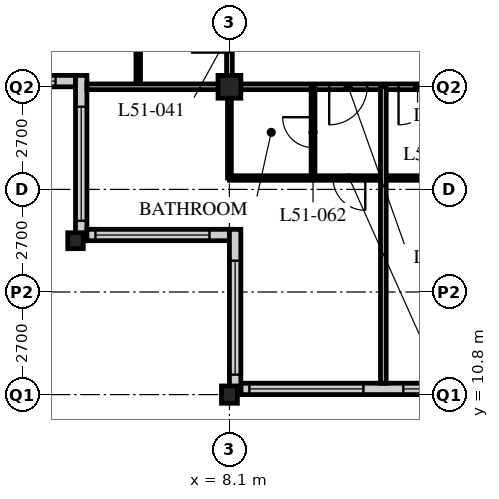
"""IFC4 building model, lengths in metres.
Left out: names, types, materials, properties, quantities, classifications, styles, units other than length and angle.
Written with IfcOpenShell. Run it as: python <this file> out.ifc"""

import sys

from ifc_helpers import new_model, si_unit, direction, frame, frame_2d, origin, origin_2d, place, context, subcontext, project, spatial, rectangle, hollow_rectangle, i_section, extrude, element, fill, save


model = new_model("IFC4")
c1 = context("Model", 3, precision=1e-05, world=origin(), true_north=direction((0.0, 1.0)))
c2 = subcontext(c1, "Body", "Model", "MODEL_VIEW")
j1 = project(units=[si_unit("LENGTHUNIT", "METRE"), si_unit("PLANEANGLEUNIT", "RADIAN")], contexts=[c1])
p1 = place(None, origin())
s1 = spatial("IfcSite", under=j1, at=p1, CompositionType="ELEMENT")
p2 = place(p1, origin())
s2 = spatial("IfcBuilding", under=s1, at=p2, CompositionType="ELEMENT")
p3 = place(p2, frame((0.0, 0.0, 199.2)))
s3 = spatial("IfcBuildingStorey", under=s2, at=p3, CompositionType="ELEMENT", Elevation=199.2)
p4 = place(p3, frame((4.05, 14.85, 0.0), z_axis=(0.0, 0.0, 1.0), x_axis=(1.0, 0.0, 0.0)))
e1 = element("IfcColumn", 1, at=p4, inside=s3, PredefinedType="COLUMN", context=c2, shape_type="SweptSolid", body=[
    extrude(i_section(OverallWidth=0.407, OverallDepth=0.419, WebThickness=0.031, FlangeThickness=0.049, FilletRadius=0.015, at=origin_2d()), origin(), (0.0, 0.0, 1.0), 3.6),
])
p5 = place(p3, frame((8.1, 10.8, 0.0), z_axis=(0.0, 0.0, 1.0), x_axis=(1.0, 0.0, 0.0)))
e2 = element("IfcColumn", 2, at=p5, inside=s3, PredefinedType="COLUMN", context=c2, shape_type="SweptSolid", body=[
    extrude(i_section(OverallWidth=0.418, OverallDepth=0.456, WebThickness=0.042, FlangeThickness=0.067, FilletRadius=0.015, at=origin_2d()), origin(), (0.0, 0.0, 1.0), 3.6),
])
p6 = place(p3, frame((8.1, 18.9, 0.0), z_axis=(0.0, 0.0, 1.0), x_axis=(1.0, 0.0, 0.0)))
e3 = element("IfcColumn", 3, at=p6, inside=s3, PredefinedType="COLUMN", context=c2, shape_type="SweptSolid", body=[
    extrude(hollow_rectangle(XDim=0.6, YDim=0.6, WallThickness=0.05, at=origin_2d()), origin(), (0.0, 0.0, 1.0), 3.6),
])
p7 = place(p3, frame((8.4, 10.95, 0.0), z_axis=(0.0, 0.0, 1.0), x_axis=(1.0, 0.0, 0.0)))
e4 = element("IfcWall", 4, at=p7, inside=s3, PredefinedType="SOLIDWALL", context=c2, shape_type="SweptSolid", body=[
    extrude(rectangle(XDim=40.2, YDim=0.3, at=frame_2d((20.1, 0.0))), origin(), (0.0, 0.0, 1.0), 3.39),
])
p8 = place(p7, frame((0.225, 0.0, 0.6)))
e5 = element("IfcOpeningElement", 5, at=p8, cuts=e4, PredefinedType="OPENING", context=c2, shape_type="SweptSolid", body=[
    extrude(rectangle(XDim=3.0, YDim=2.4, at=frame_2d((1.5, 1.2))), frame((0.0, 0.16, 0.0), z_axis=(0.0, -1.0, 0.0), x_axis=(1.0, 0.0, 0.0)), (0.0, 0.0, 1.0), 0.32),
])
p9 = place(p7, frame((4.275, 0.0, 0.6)))
e6 = element("IfcOpeningElement", 6, at=p9, cuts=e4, PredefinedType="OPENING", context=c2, shape_type="SweptSolid", body=[
    extrude(rectangle(XDim=3.0, YDim=2.4, at=frame_2d((1.5, 1.2))), frame((0.0, 0.16, 0.0), z_axis=(0.0, -1.0, 0.0), x_axis=(1.0, 0.0, 0.0)), (0.0, 0.0, 1.0), 0.32),
])
p10 = place(p7, frame((8.325, 0.0, 0.6)))
e7 = element("IfcOpeningElement", 7, at=p10, cuts=e4, PredefinedType="OPENING", context=c2, shape_type="SweptSolid", body=[
    extrude(rectangle(XDim=3.0, YDim=2.4, at=frame_2d((1.5, 1.2))), frame((0.0, 0.16, 0.0), z_axis=(0.0, -1.0, 0.0), x_axis=(1.0, 0.0, 0.0)), (0.0, 0.0, 1.0), 0.32),
])
p11 = place(p7, frame((12.375, 0.0, 0.6)))
e8 = element("IfcOpeningElement", 8, at=p11, cuts=e4, PredefinedType="OPENING", context=c2, shape_type="SweptSolid", body=[
    extrude(rectangle(XDim=3.0, YDim=2.4, at=frame_2d((1.5, 1.2))), frame((0.0, 0.16, 0.0), z_axis=(0.0, -1.0, 0.0), x_axis=(1.0, 0.0, 0.0)), (0.0, 0.0, 1.0), 0.32),
])
p12 = place(p7, frame((16.425, 0.0, 0.6)))
e9 = element("IfcOpeningElement", 9, at=p12, cuts=e4, PredefinedType="OPENING", context=c2, shape_type="SweptSolid", body=[
    extrude(rectangle(XDim=3.0, YDim=2.4, at=frame_2d((1.5, 1.2))), frame((0.0, 0.16, 0.0), z_axis=(0.0, -1.0, 0.0), x_axis=(1.0, 0.0, 0.0)), (0.0, 0.0, 1.0), 0.32),
])
p13 = place(p7, frame((20.475, 0.0, 0.6)))
e10 = element("IfcOpeningElement", 10, at=p13, cuts=e4, PredefinedType="OPENING", context=c2, shape_type="SweptSolid", body=[
    extrude(rectangle(XDim=3.0, YDim=2.4, at=frame_2d((1.5, 1.2))), frame((0.0, 0.16, 0.0), z_axis=(0.0, -1.0, 0.0), x_axis=(1.0, 0.0, 0.0)), (0.0, 0.0, 1.0), 0.32),
])
p14 = place(p7, frame((24.525, 0.0, 0.6)))
e11 = element("IfcOpeningElement", 11, at=p14, cuts=e4, PredefinedType="OPENING", context=c2, shape_type="SweptSolid", body=[
    extrude(rectangle(XDim=3.0, YDim=2.4, at=frame_2d((1.5, 1.2))), frame((0.0, 0.16, 0.0), z_axis=(0.0, -1.0, 0.0), x_axis=(1.0, 0.0, 0.0)), (0.0, 0.0, 1.0), 0.32),
])
p15 = place(p7, frame((28.575, 0.0, 0.6)))
e12 = element("IfcOpeningElement", 12, at=p15, cuts=e4, PredefinedType="OPENING", context=c2, shape_type="SweptSolid", body=[
    extrude(rectangle(XDim=3.0, YDim=2.4, at=frame_2d((1.5, 1.2))), frame((0.0, 0.16, 0.0), z_axis=(0.0, -1.0, 0.0), x_axis=(1.0, 0.0, 0.0)), (0.0, 0.0, 1.0), 0.32),
])
p16 = place(p7, frame((32.625, 0.0, 0.6)))
e13 = element("IfcOpeningElement", 13, at=p16, cuts=e4, PredefinedType="OPENING", context=c2, shape_type="SweptSolid", body=[
    extrude(rectangle(XDim=3.0, YDim=2.4, at=frame_2d((1.5, 1.2))), frame((0.0, 0.16, 0.0), z_axis=(0.0, -1.0, 0.0), x_axis=(1.0, 0.0, 0.0)), (0.0, 0.0, 1.0), 0.32),
])
p17 = place(p7, frame((36.675, 0.0, 0.6)))
e14 = element("IfcOpeningElement", 14, at=p17, cuts=e4, PredefinedType="OPENING", context=c2, shape_type="SweptSolid", body=[
    extrude(rectangle(XDim=3.0, YDim=2.4, at=frame_2d((1.5, 1.2))), frame((0.0, 0.16, 0.0), z_axis=(0.0, -1.0, 0.0), x_axis=(1.0, 0.0, 0.0)), (0.0, 0.0, 1.0), 0.32),
])
p18 = place(p3, frame((0.3, 19.05, 0.0), z_axis=(0.0, 0.0, 1.0), x_axis=(1.0, 0.0, 0.0)))
e15 = element("IfcWall", 15, at=p18, inside=s3, PredefinedType="SOLIDWALL", context=c2, shape_type="SweptSolid", body=[
    extrude(rectangle(XDim=3.75, YDim=0.3, at=frame_2d((1.875, 0.0))), origin(), (0.0, 0.0, 1.0), 3.39),
])
p19 = place(p18, frame((0.225, 0.0, 0.6)))
e16 = element("IfcOpeningElement", 16, at=p19, cuts=e15, PredefinedType="OPENING", context=c2, shape_type="SweptSolid", body=[
    extrude(rectangle(XDim=3.0, YDim=2.0, at=frame_2d((1.5, 1.0))), frame((0.0, 0.16, 0.0), z_axis=(0.0, -1.0, 0.0), x_axis=(1.0, 0.0, 0.0)), (0.0, 0.0, 1.0), 0.32),
])
p20 = place(p3, frame((4.2, 19.2, 0.0), z_axis=(0.0, 0.0, 1.0), x_axis=(0.0, -1.0, 0.0)))
e17 = element("IfcWall", 17, at=p20, inside=s3, PredefinedType="SOLIDWALL", context=c2, shape_type="SweptSolid", body=[
    extrude(rectangle(XDim=4.35, YDim=0.3, at=frame_2d((2.175, 0.0))), origin(), (0.0, 0.0, 1.0), 3.39),
])
p21 = place(p20, frame((0.825, 0.0, 0.6)))
e18 = element("IfcOpeningElement", 18, at=p21, cuts=e17, PredefinedType="OPENING", context=c2, shape_type="SweptSolid", body=[
    extrude(rectangle(XDim=3.0, YDim=2.0, at=frame_2d((1.5, 1.0))), frame((0.0, 0.16, 0.0), z_axis=(0.0, -1.0, 0.0), x_axis=(1.0, 0.0, 0.0)), (0.0, 0.0, 1.0), 0.32),
])
p22 = place(p3, frame((4.35, 15.0, 0.0), z_axis=(0.0, 0.0, 1.0), x_axis=(1.0, 0.0, 0.0)))
e19 = element("IfcWall", 19, at=p22, inside=s3, PredefinedType="SOLIDWALL", context=c2, shape_type="SweptSolid", body=[
    extrude(rectangle(XDim=3.75, YDim=0.3, at=frame_2d((1.875, 0.0))), origin(), (0.0, 0.0, 1.0), 3.39),
])
p23 = place(p22, frame((0.225, 0.0, 0.6)))
e20 = element("IfcOpeningElement", 20, at=p23, cuts=e19, PredefinedType="OPENING", context=c2, shape_type="SweptSolid", body=[
    extrude(rectangle(XDim=3.0, YDim=2.0, at=frame_2d((1.5, 1.0))), frame((0.0, 0.16, 0.0), z_axis=(0.0, -1.0, 0.0), x_axis=(1.0, 0.0, 0.0)), (0.0, 0.0, 1.0), 0.32),
])
p24 = place(p3, frame((8.25, 15.15, 0.0), z_axis=(0.0, 0.0, 1.0), x_axis=(0.0, -1.0, 0.0)))
e21 = element("IfcWall", 21, at=p24, inside=s3, PredefinedType="SOLIDWALL", context=c2, shape_type="SweptSolid", body=[
    extrude(rectangle(XDim=4.35, YDim=0.3, at=frame_2d((2.175, 0.0))), origin(), (0.0, 0.0, 1.0), 3.39),
])
p25 = place(p24, frame((0.825, 0.0, 0.6)))
e22 = element("IfcOpeningElement", 22, at=p25, cuts=e21, PredefinedType="OPENING", context=c2, shape_type="SweptSolid", body=[
    extrude(rectangle(XDim=3.0, YDim=2.0, at=frame_2d((1.5, 1.0))), frame((0.0, 0.16, 0.0), z_axis=(0.0, -1.0, 0.0), x_axis=(1.0, 0.0, 0.0)), (0.0, 0.0, 1.0), 0.32),
])
p26 = place(p3, frame((8.1, 18.9, 0.0), z_axis=(0.0, 0.0, 1.0), x_axis=(1.0, 0.0, 0.0)))
e23 = element("IfcWall", 23, at=p26, inside=s3, PredefinedType="PARTITIONING", context=c2, shape_type="SweptSolid", body=[
    extrude(rectangle(XDim=40.5, YDim=0.15, at=frame_2d((20.25, 0.0))), origin(), (0.0, 0.0, 1.0), 2.778),
])
p27 = place(p26, frame((4.45, 0.0, 0.0)))
e24 = element("IfcOpeningElement", 24, at=p27, cuts=e23, PredefinedType="OPENING", context=c2, shape_type="SweptSolid", body=[
    extrude(rectangle(XDim=1.0, YDim=2.1, at=frame_2d((0.5, 1.05))), frame((0.0, 0.085, 0.0), z_axis=(0.0, -1.0, 0.0), x_axis=(1.0, 0.0, 0.0)), (0.0, 0.0, 1.0), 0.17),
])
p28 = place(p26, frame((17.1, 0.0, 0.0)))
e25 = element("IfcOpeningElement", 25, at=p28, cuts=e23, PredefinedType="OPENING", context=c2, shape_type="SweptSolid", body=[
    extrude(rectangle(XDim=1.0, YDim=2.1, at=frame_2d((0.5, 1.05))), frame((0.0, 0.085, 0.0), z_axis=(0.0, -1.0, 0.0), x_axis=(1.0, 0.0, 0.0)), (0.0, 0.0, 1.0), 0.17),
])
p29 = place(p26, frame((28.75, 0.0, 0.0)))
e26 = element("IfcOpeningElement", 26, at=p29, cuts=e23, PredefinedType="OPENING", context=c2, shape_type="SweptSolid", body=[
    extrude(rectangle(XDim=1.0, YDim=2.1, at=frame_2d((0.5, 1.05))), frame((0.0, 0.085, 0.0), z_axis=(0.0, -1.0, 0.0), x_axis=(1.0, 0.0, 0.0)), (0.0, 0.0, 1.0), 0.17),
])
p30 = place(p26, frame((2.625, 0.0, 0.0)))
e27 = element("IfcOpeningElement", 27, at=p30, cuts=e23, PredefinedType="OPENING", context=c2, shape_type="SweptSolid", body=[
    extrude(rectangle(XDim=1.0, YDim=2.1, at=frame_2d((0.5, 1.05))), frame((0.0, 0.085, 0.0), z_axis=(0.0, -1.0, 0.0), x_axis=(1.0, 0.0, 0.0)), (0.0, 0.0, 1.0), 0.17),
])
p31 = place(p26, frame((36.875, 0.0, 0.0)))
e28 = element("IfcOpeningElement", 28, at=p31, cuts=e23, PredefinedType="OPENING", context=c2, shape_type="SweptSolid", body=[
    extrude(rectangle(XDim=1.0, YDim=2.1, at=frame_2d((0.5, 1.05))), frame((0.0, 0.085, 0.0), z_axis=(0.0, -1.0, 0.0), x_axis=(1.0, 0.0, 0.0)), (0.0, 0.0, 1.0), 0.17),
])
p32 = place(p3, frame((8.1, 18.9, 0.0), z_axis=(0.0, 0.0, 1.0), x_axis=(0.0, 1.0, 0.0)))
e29 = element("IfcWall", 29, at=p32, inside=s3, PredefinedType="PARTITIONING", context=c2, shape_type="SweptSolid", body=[
    extrude(rectangle(XDim=24.3, YDim=0.15, at=frame_2d((12.15, 0.0))), origin(), (0.0, 0.0, 1.0), 2.778),
])
p33 = place(p32, frame((0.9, 0.0, 0.0)))
e30 = element("IfcOpeningElement", 30, at=p33, cuts=e29, PredefinedType="OPENING", context=c2, shape_type="SweptSolid", body=[
    extrude(rectangle(XDim=1.0, YDim=2.1, at=frame_2d((0.5, 1.05))), frame((0.0, 0.085, 0.0), z_axis=(0.0, -1.0, 0.0), x_axis=(1.0, 0.0, 0.0)), (0.0, 0.0, 1.0), 0.17),
])
p34 = place(p32, frame((9.0, 0.0, 0.0)))
e31 = element("IfcOpeningElement", 31, at=p34, cuts=e29, PredefinedType="OPENING", context=c2, shape_type="SweptSolid", body=[
    extrude(rectangle(XDim=1.0, YDim=2.1, at=frame_2d((0.5, 1.05))), frame((0.0, 0.085, 0.0), z_axis=(0.0, -1.0, 0.0), x_axis=(1.0, 0.0, 0.0)), (0.0, 0.0, 1.0), 0.17),
])
p35 = place(p32, frame((17.1, 0.0, 0.0)))
e32 = element("IfcOpeningElement", 32, at=p35, cuts=e29, PredefinedType="OPENING", context=c2, shape_type="SweptSolid", body=[
    extrude(rectangle(XDim=1.0, YDim=2.1, at=frame_2d((0.5, 1.05))), frame((0.0, 0.085, 0.0), z_axis=(0.0, -1.0, 0.0), x_axis=(1.0, 0.0, 0.0)), (0.0, 0.0, 1.0), 0.17),
])
p36 = place(p3, frame((5.7, 18.9, 0.0), z_axis=(0.0, 0.0, 1.0), x_axis=(0.0, 1.0, 0.0)))
e33 = element("IfcWall", 33, at=p36, inside=s3, PredefinedType="PARTITIONING", context=c2, shape_type="SweptSolid", body=[
    extrude(rectangle(XDim=24.3, YDim=0.12, at=frame_2d((12.15, 0.0))), origin(), (0.0, 0.0, 1.0), 3.39),
])
p37 = place(p36, frame((0.975, 0.0, 0.0)))
e34 = element("IfcOpeningElement", 34, at=p37, cuts=e33, PredefinedType="OPENING", context=c2, shape_type="SweptSolid", body=[
    extrude(rectangle(XDim=0.85, YDim=2.1, at=frame_2d((0.425, 1.05))), frame((0.0, 0.07, 0.0), z_axis=(0.0, -1.0, 0.0), x_axis=(1.0, 0.0, 0.0)), (0.0, 0.0, 1.0), 0.14),
])
p38 = place(p36, frame((4.375, 0.0, 0.0)))
e35 = element("IfcOpeningElement", 35, at=p38, cuts=e33, PredefinedType="OPENING", context=c2, shape_type="SweptSolid", body=[
    extrude(rectangle(XDim=0.85, YDim=2.1, at=frame_2d((0.425, 1.05))), frame((0.0, 0.07, 0.0), z_axis=(0.0, -1.0, 0.0), x_axis=(1.0, 0.0, 0.0)), (0.0, 0.0, 1.0), 0.14),
])
p39 = place(p36, frame((9.075, 0.0, 0.0)))
e36 = element("IfcOpeningElement", 36, at=p39, cuts=e33, PredefinedType="OPENING", context=c2, shape_type="SweptSolid", body=[
    extrude(rectangle(XDim=0.85, YDim=2.1, at=frame_2d((0.425, 1.05))), frame((0.0, 0.07, 0.0), z_axis=(0.0, -1.0, 0.0), x_axis=(1.0, 0.0, 0.0)), (0.0, 0.0, 1.0), 0.14),
])
p40 = place(p36, frame((12.475, 0.0, 0.0)))
e37 = element("IfcOpeningElement", 37, at=p40, cuts=e33, PredefinedType="OPENING", context=c2, shape_type="SweptSolid", body=[
    extrude(rectangle(XDim=0.85, YDim=2.1, at=frame_2d((0.425, 1.05))), frame((0.0, 0.07, 0.0), z_axis=(0.0, -1.0, 0.0), x_axis=(1.0, 0.0, 0.0)), (0.0, 0.0, 1.0), 0.14),
])
p41 = place(p36, frame((17.175, 0.0, 0.0)))
e38 = element("IfcOpeningElement", 38, at=p41, cuts=e33, PredefinedType="OPENING", context=c2, shape_type="SweptSolid", body=[
    extrude(rectangle(XDim=0.85, YDim=2.1, at=frame_2d((0.425, 1.05))), frame((0.0, 0.07, 0.0), z_axis=(0.0, -1.0, 0.0), x_axis=(1.0, 0.0, 0.0)), (0.0, 0.0, 1.0), 0.14),
])
p42 = place(p36, frame((20.575, 0.0, 0.0)))
e39 = element("IfcOpeningElement", 39, at=p42, cuts=e33, PredefinedType="OPENING", context=c2, shape_type="SweptSolid", body=[
    extrude(rectangle(XDim=0.85, YDim=2.1, at=frame_2d((0.425, 1.05))), frame((0.0, 0.07, 0.0), z_axis=(0.0, -1.0, 0.0), x_axis=(1.0, 0.0, 0.0)), (0.0, 0.0, 1.0), 0.14),
])
p43 = place(p3, frame((8.1, 16.5, 0.0), z_axis=(0.0, 0.0, 1.0), x_axis=(1.0, 0.0, 0.0)))
e40 = element("IfcWall", 40, at=p43, inside=s3, PredefinedType="PARTITIONING", context=c2, shape_type="SweptSolid", body=[
    extrude(rectangle(XDim=40.5, YDim=0.12, at=frame_2d((20.25, 0.0))), origin(), (0.0, 0.0, 1.0), 3.39),
])
p44 = place(p43, frame((5.025, 0.0, 0.0)))
e41 = element("IfcOpeningElement", 41, at=p44, cuts=e40, PredefinedType="OPENING", context=c2, shape_type="SweptSolid", body=[
    extrude(rectangle(XDim=0.85, YDim=2.1, at=frame_2d((0.425, 1.05))), frame((0.0, 0.07, 0.0), z_axis=(0.0, -1.0, 0.0), x_axis=(1.0, 0.0, 0.0)), (0.0, 0.0, 1.0), 0.14),
])
p45 = place(p43, frame((12.475, 0.0, 0.0)))
e42 = element("IfcOpeningElement", 42, at=p45, cuts=e40, PredefinedType="OPENING", context=c2, shape_type="SweptSolid", body=[
    extrude(rectangle(XDim=0.85, YDim=2.1, at=frame_2d((0.425, 1.05))), frame((0.0, 0.07, 0.0), z_axis=(0.0, -1.0, 0.0), x_axis=(1.0, 0.0, 0.0)), (0.0, 0.0, 1.0), 0.14),
])
p46 = place(p43, frame((17.175, 0.0, 0.0)))
e43 = element("IfcOpeningElement", 43, at=p46, cuts=e40, PredefinedType="OPENING", context=c2, shape_type="SweptSolid", body=[
    extrude(rectangle(XDim=0.85, YDim=2.1, at=frame_2d((0.425, 1.05))), frame((0.0, 0.07, 0.0), z_axis=(0.0, -1.0, 0.0), x_axis=(1.0, 0.0, 0.0)), (0.0, 0.0, 1.0), 0.14),
])
p47 = place(p43, frame((24.625, 0.0, 0.0)))
e44 = element("IfcOpeningElement", 44, at=p47, cuts=e40, PredefinedType="OPENING", context=c2, shape_type="SweptSolid", body=[
    extrude(rectangle(XDim=0.85, YDim=2.1, at=frame_2d((0.425, 1.05))), frame((0.0, 0.07, 0.0), z_axis=(0.0, -1.0, 0.0), x_axis=(1.0, 0.0, 0.0)), (0.0, 0.0, 1.0), 0.14),
])
p48 = place(p43, frame((29.325, 0.0, 0.0)))
e45 = element("IfcOpeningElement", 45, at=p48, cuts=e40, PredefinedType="OPENING", context=c2, shape_type="SweptSolid", body=[
    extrude(rectangle(XDim=0.85, YDim=2.1, at=frame_2d((0.425, 1.05))), frame((0.0, 0.07, 0.0), z_axis=(0.0, -1.0, 0.0), x_axis=(1.0, 0.0, 0.0)), (0.0, 0.0, 1.0), 0.14),
])
p49 = place(p43, frame((32.725, 0.0, 0.0)))
e46 = element("IfcOpeningElement", 46, at=p49, cuts=e40, PredefinedType="OPENING", context=c2, shape_type="SweptSolid", body=[
    extrude(rectangle(XDim=0.85, YDim=2.1, at=frame_2d((0.425, 1.05))), frame((0.0, 0.07, 0.0), z_axis=(0.0, -1.0, 0.0), x_axis=(1.0, 0.0, 0.0)), (0.0, 0.0, 1.0), 0.14),
])
p50 = place(p43, frame((2.725, 0.0, 0.0)))
e47 = element("IfcOpeningElement", 47, at=p50, cuts=e40, PredefinedType="OPENING", context=c2, shape_type="SweptSolid", body=[
    extrude(rectangle(XDim=0.85, YDim=2.1, at=frame_2d((0.425, 1.05))), frame((0.0, 0.07, 0.0), z_axis=(0.0, -1.0, 0.0), x_axis=(1.0, 0.0, 0.0)), (0.0, 0.0, 1.0), 0.14),
])
p51 = place(p43, frame((36.925, 0.0, 0.0)))
e48 = element("IfcOpeningElement", 48, at=p51, cuts=e40, PredefinedType="OPENING", context=c2, shape_type="SweptSolid", body=[
    extrude(rectangle(XDim=0.85, YDim=2.1, at=frame_2d((0.425, 1.05))), frame((0.0, 0.07, 0.0), z_axis=(0.0, -1.0, 0.0), x_axis=(1.0, 0.0, 0.0)), (0.0, 0.0, 1.0), 0.14),
])
p52 = place(p3, frame((10.3, 18.9, 0.0), z_axis=(0.0, 0.0, 1.0), x_axis=(0.0, -1.0, 0.0)))
e49 = element("IfcWall", 49, at=p52, inside=s3, PredefinedType="PARTITIONING", context=c2, shape_type="SweptSolid", body=[
    extrude(rectangle(XDim=2.4, YDim=0.1, at=frame_2d((1.2, 0.0))), origin(), (0.0, 0.0, 1.0), 3.39),
])
p53 = place(p52, frame((0.8, 0.0, 0.0)))
e50 = element("IfcOpeningElement", 50, at=p53, cuts=e49, PredefinedType="OPENING", context=c2, shape_type="SweptSolid", body=[
    extrude(rectangle(XDim=0.8, YDim=2.1, at=frame_2d((0.4, 1.05))), frame((0.0, 0.06, 0.0), z_axis=(0.0, -1.0, 0.0), x_axis=(1.0, 0.0, 0.0)), (0.0, 0.0, 1.0), 0.12),
])
p54 = place(p3, frame((8.1, 18.9, 0.0), z_axis=(0.0, 0.0, 1.0), x_axis=(0.0, -1.0, 0.0)))
e51 = element("IfcWall", 51, at=p54, inside=s3, PredefinedType="PARTITIONING", context=c2, shape_type="SweptSolid", body=[
    extrude(rectangle(XDim=2.4, YDim=0.1, at=frame_2d((1.2, 0.0))), origin(), (0.0, 0.0, 1.0), 2.778),
])
p55 = place(p3, frame((4.35, 18.9, 0.0), z_axis=(0.0, 0.0, 1.0), x_axis=(1.0, 0.0, 0.0)))
e52 = element("IfcWall", 52, at=p55, inside=s3, PredefinedType="PARTITIONING", context=c2, shape_type="SweptSolid", body=[
    extrude(rectangle(XDim=3.75, YDim=0.15, at=frame_2d((1.875, 0.0))), origin(), (0.0, 0.0, 1.0), 2.778),
])
p56 = place(p3, frame((12.15, 18.9, 0.0), z_axis=(0.0, 0.0, 1.0), x_axis=(0.0, -1.0, 0.0)))
e53 = element("IfcWall", 53, at=p56, inside=s3, PredefinedType="PARTITIONING", context=c2, shape_type="SweptSolid", body=[
    extrude(rectangle(XDim=7.8, YDim=0.15, at=frame_2d((3.9, 0.0))), origin(), (0.0, 0.0, 1.0), 3.39),
])
p57 = place(p8, origin())
e54 = element("IfcWindow", 54, at=p57, inside=s3, PartitioningType="SINGLE_PANEL", PredefinedType="WINDOW", context=c2, shape_type="SweptSolid", body=[
    extrude(rectangle(XDim=3.0, YDim=2.4, at=frame_2d((1.5, 1.2))), frame((0.0, 0.03, 0.0), z_axis=(0.0, -1.0, 0.0), x_axis=(1.0, 0.0, 0.0)), (0.0, 0.0, 1.0), 0.06),
])
fill(e5, e54)
p58 = place(p9, origin())
e55 = element("IfcWindow", 55, at=p58, inside=s3, PartitioningType="SINGLE_PANEL", PredefinedType="WINDOW", context=c2, shape_type="SweptSolid", body=[
    extrude(rectangle(XDim=3.0, YDim=2.4, at=frame_2d((1.5, 1.2))), frame((0.0, 0.03, 0.0), z_axis=(0.0, -1.0, 0.0), x_axis=(1.0, 0.0, 0.0)), (0.0, 0.0, 1.0), 0.06),
])
fill(e6, e55)
p59 = place(p19, origin())
e56 = element("IfcWindow", 56, at=p59, inside=s3, PartitioningType="SINGLE_PANEL", PredefinedType="WINDOW", context=c2, shape_type="SweptSolid", body=[
    extrude(rectangle(XDim=3.0, YDim=2.0, at=frame_2d((1.5, 1.0))), frame((0.0, 0.03, 0.0), z_axis=(0.0, -1.0, 0.0), x_axis=(1.0, 0.0, 0.0)), (0.0, 0.0, 1.0), 0.06),
])
fill(e16, e56)
p60 = place(p21, origin())
e57 = element("IfcWindow", 57, at=p60, inside=s3, PartitioningType="SINGLE_PANEL", PredefinedType="WINDOW", context=c2, shape_type="SweptSolid", body=[
    extrude(rectangle(XDim=3.0, YDim=2.0, at=frame_2d((1.5, 1.0))), frame((0.0, 0.03, 0.0), z_axis=(0.0, -1.0, 0.0), x_axis=(1.0, 0.0, 0.0)), (0.0, 0.0, 1.0), 0.06),
])
fill(e18, e57)
p61 = place(p23, origin())
e58 = element("IfcWindow", 58, at=p61, inside=s3, PartitioningType="SINGLE_PANEL", PredefinedType="WINDOW", context=c2, shape_type="SweptSolid", body=[
    extrude(rectangle(XDim=3.0, YDim=2.0, at=frame_2d((1.5, 1.0))), frame((0.0, 0.03, 0.0), z_axis=(0.0, -1.0, 0.0), x_axis=(1.0, 0.0, 0.0)), (0.0, 0.0, 1.0), 0.06),
])
fill(e20, e58)
p62 = place(p25, origin())
e59 = element("IfcWindow", 59, at=p62, inside=s3, PartitioningType="SINGLE_PANEL", PredefinedType="WINDOW", context=c2, shape_type="SweptSolid", body=[
    extrude(rectangle(XDim=3.0, YDim=2.0, at=frame_2d((1.5, 1.0))), frame((0.0, 0.03, 0.0), z_axis=(0.0, -1.0, 0.0), x_axis=(1.0, 0.0, 0.0)), (0.0, 0.0, 1.0), 0.06),
])
fill(e22, e59)
p63 = place(p27, origin())
e60 = element("IfcDoor", 60, at=p63, inside=s3, OperationType="SINGLE_SWING_RIGHT", PredefinedType="DOOR", context=c2, shape_type="SweptSolid", body=[
    extrude(rectangle(XDim=1.0, YDim=2.1, at=frame_2d((0.5, 1.05))), frame((0.0, 0.025, 0.0), z_axis=(0.0, -1.0, 0.0), x_axis=(1.0, 0.0, 0.0)), (0.0, 0.0, 1.0), 0.05),
])
fill(e24, e60)
p64 = place(p33, origin())
e61 = element("IfcDoor", 61, at=p64, inside=s3, OperationType="SINGLE_SWING_LEFT", PredefinedType="DOOR", context=c2, shape_type="SweptSolid", body=[
    extrude(rectangle(XDim=1.0, YDim=2.1, at=frame_2d((0.5, 1.05))), frame((0.0, 0.025, 0.0), z_axis=(0.0, -1.0, 0.0), x_axis=(1.0, 0.0, 0.0)), (0.0, 0.0, 1.0), 0.05),
])
fill(e30, e61)
p65 = place(p53, origin())
e62 = element("IfcDoor", 62, at=p65, inside=s3, OperationType="SINGLE_SWING_RIGHT", PredefinedType="DOOR", context=c2, shape_type="SweptSolid", body=[
    extrude(rectangle(XDim=0.8, YDim=2.1, at=frame_2d((0.4, 1.05))), frame((0.0, 0.025, 0.0), z_axis=(0.0, -1.0, 0.0), x_axis=(1.0, 0.0, 0.0)), (0.0, 0.0, 1.0), 0.05),
])
fill(e50, e62)
p66 = place(p30, origin())
e63 = element("IfcDoor", 63, at=p66, inside=s3, OperationType="SINGLE_SWING_RIGHT", PredefinedType="DOOR", context=c2, shape_type="SweptSolid", body=[
    extrude(rectangle(XDim=1.0, YDim=2.1, at=frame_2d((0.5, 1.05))), frame((0.0, 0.025, 0.0), z_axis=(0.0, -1.0, 0.0), x_axis=(1.0, 0.0, 0.0)), (0.0, 0.0, 1.0), 0.05),
])
fill(e27, e63)
p67 = place(p50, origin())
e64 = element("IfcDoor", 64, at=p67, inside=s3, OperationType="SINGLE_SWING_LEFT", PredefinedType="DOOR", context=c2, shape_type="SweptSolid", body=[
    extrude(rectangle(XDim=0.85, YDim=2.1, at=frame_2d((0.425, 1.05))), frame((0.0, 0.025, 0.0), z_axis=(0.0, -1.0, 0.0), x_axis=(1.0, 0.0, 0.0)), (0.0, 0.0, 1.0), 0.05),
])
fill(e47, e64)
save(model, sys.argv[1])
